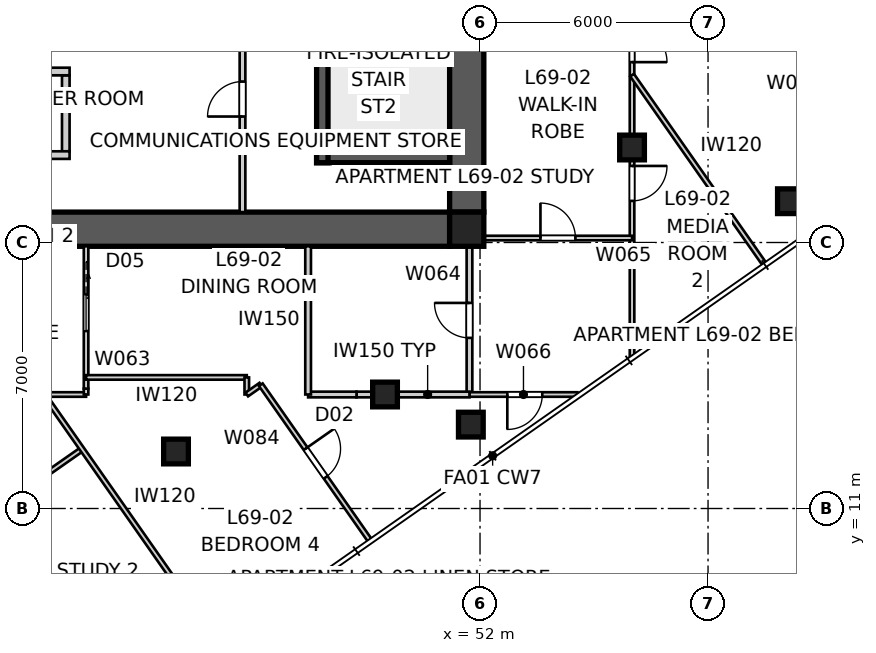
"""IFC4 building model, lengths in metres.
Left out: names, types, materials, properties, quantities, classifications, styles, units other than length and angle.
Written with IfcOpenShell. Run it as: python <this file> out.ifc"""

import sys

from ifc_helpers import new_model, si_unit, direction, frame, frame_2d, origin, origin_2d, place, context, subcontext, project, spatial, polyline, rectangle, outline, extrude, element, fill, save


model = new_model("IFC4")
c1 = context("Model", 3, precision=1e-05, world=origin(), true_north=direction((0.0, 1.0)))
c2 = subcontext(c1, "Body", "Model", "MODEL_VIEW")
j1 = project(units=[si_unit("LENGTHUNIT", "METRE"), si_unit("PLANEANGLEUNIT", "RADIAN")], contexts=[c1])
p1 = place(None, origin())
s1 = spatial("IfcSite", under=j1, at=p1, CompositionType="ELEMENT")
p2 = place(p1, origin())
s2 = spatial("IfcBuilding", under=s1, at=p2, CompositionType="ELEMENT")
p3 = place(p2, frame((0.0, 0.0, 250.6)))
s3 = spatial("IfcBuildingStorey", under=s2, at=p3, CompositionType="ELEMENT", Elevation=250.6)
p4 = place(p3, frame((51.2, 18.35, 0.0), z_axis=(0.0, 0.0, 1.0), x_axis=(-1.0, 0.0, 0.0)))
e1 = element("IfcWall", 1, at=p4, inside=s3, PredefinedType="SHEAR", context=c2, shape_type="SweptSolid", body=[
    extrude(outline(polyline([(0.0, -0.45), (22.4, -0.45), (22.4, -0.025), (22.85, -0.025), (22.85, 0.025), (22.4, 0.025), (22.4, 0.45), (0.0, 0.45), (0.0, 0.025), (-0.45, 0.025), (-0.45, -0.025), (0.0, -0.025), (0.0, -0.45)])), origin(), (0.0, 0.0, 1.0), 3.4),
])
p5 = place(p3, frame((51.65, 18.8, 0.0), z_axis=(0.0, 0.0, 1.0), x_axis=(0.0, 1.0, 0.0)))
e2 = element("IfcWall", 2, at=p5, inside=s3, PredefinedType="SHEAR", context=c2, shape_type="SweptSolid", body=[
    extrude(outline(polyline([(0.0, -0.45), (22.4, -0.45), (22.4, -0.025), (22.85, -0.025), (22.85, 0.025), (22.4, 0.025), (22.4, 0.45), (0.0, 0.45), (0.0, 0.025), (-0.45, 0.025), (-0.45, -0.025), (0.0, -0.025), (0.0, -0.45)])), origin(), (0.0, 0.0, 1.0), 3.4),
])
p6 = place(p5, frame((11.14, 0.0, 0.0)))
e3 = element("IfcOpeningElement", 3, at=p6, cuts=e2, PredefinedType="OPENING", context=c2, shape_type="SweptSolid", body=[
    extrude(rectangle(XDim=1.02, YDim=2.4, at=frame_2d((0.51, 1.2))), frame((0.0, 0.46, 0.0), z_axis=(0.0, -1.0, 0.0), x_axis=(1.0, 0.0, 0.0)), (0.0, 0.0, 1.0), 0.92),
])
p7 = place(p3, frame((47.85, 27.8, 0.0), z_axis=(0.0, 0.0, 1.0), x_axis=(0.0, -1.0, 0.0)))
e4 = element("IfcWall", 4, at=p7, inside=s3, PredefinedType="SHEAR", context=c2, shape_type="SweptSolid", body=[
    extrude(rectangle(XDim=7.7, YDim=0.3, at=frame_2d((3.85, 0.0))), origin(), (0.0, 0.0, 1.0), 3.4),
])
p8 = place(p3, frame((51.2, 20.25, 0.0), z_axis=(0.0, 0.0, 1.0), x_axis=(-1.0, 0.0, 0.0)))
e5 = element("IfcWall", 5, at=p8, inside=s3, PredefinedType="SHEAR", context=c2, shape_type="SweptSolid", body=[
    extrude(rectangle(XDim=3.5, YDim=0.3, at=frame_2d((1.75, 0.0))), origin(), (0.0, 0.0, 1.0), 3.4),
])
p9 = place(p3, frame((41.1, 22.4, 0.0), z_axis=(0.0, 0.0, 1.0), x_axis=(0.0, -1.0, 0.0)))
e6 = element("IfcWall", 6, at=p9, inside=s3, PredefinedType="SOLIDWALL", context=c2, shape_type="SweptSolid", body=[
    extrude(rectangle(XDim=2.0, YDim=0.2, at=frame_2d((1.0, 0.0))), origin(), (0.0, 0.0, 1.0), 3.4),
])
for number, where, z_axis, x_axis in (
    (7, (38.8, 22.5, 0.0), (0.0, 0.0, 1.0), (1.0, 0.0, 0.0)),
    (8, (38.8, 20.3, 0.0), (0.0, 0.0, 1.0), (1.0, 0.0, 0.0)),
):
    element("IfcWall", number, at=place(p3, frame(where, z_axis=z_axis, x_axis=x_axis)), inside=s3, PredefinedType="SOLIDWALL", context=c2, shape_type="SweptSolid", body=[
        extrude(rectangle(XDim=2.4, YDim=0.2, at=frame_2d((1.2, 0.0))), origin(), (0.0, 0.0, 1.0), 3.4),
    ])
p10 = place(p3, frame((51.65, 18.35, 0.0), z_axis=(0.0, 0.0, 1.0), x_axis=(1.0, 0.0, 0.0)))
e9 = element("IfcColumn", 9, at=p10, inside=s3, PredefinedType="COLUMN", context=c2, shape_type="SweptSolid", body=[
    extrude(rectangle(XDim=0.9, YDim=0.9, at=origin_2d()), origin(), (0.0, 0.0, 1.0), 3.4),
])
for number, where, z_axis, x_axis in (
    (10, (51.758, 13.207, 0.0), (0.0, 0.0, 1.0), (1.0, 0.0, 0.0)),
    (11, (60.155, 19.086, 0.0), (0.0, 0.0, 1.0), (1.0, 0.0, 0.0)),
    (12, (44.0, 12.5, 0.0), (0.0, 0.0, 1.0), (1.0, 0.0, 0.0)),
    (13, (49.5, 14.0, 0.0), (0.0, 0.0, 1.0), (1.0, 0.0, 0.0)),
    (14, (56.0, 20.5, 0.0), (0.0, 0.0, 1.0), (1.0, 0.0, 0.0)),
):
    element("IfcColumn", number, at=place(p3, frame(where, z_axis=z_axis, x_axis=x_axis)), inside=s3, PredefinedType="COLUMN", context=c2, shape_type="SweptSolid", body=[
        extrude(rectangle(XDim=0.65, YDim=0.65, at=origin_2d()), origin(), (0.0, 0.0, 1.0), 3.4),
    ])
p11 = place(p3, frame((45.75, 18.8, 0.0), z_axis=(0.0, 0.0, 1.0), x_axis=(0.0, 1.0, 0.0)))
e15 = element("IfcWall", 15, at=p11, inside=s3, PredefinedType="SOLIDWALL", context=c2, shape_type="SweptSolid", body=[
    extrude(rectangle(XDim=5.95, YDim=0.15, at=frame_2d((2.975, 0.0))), origin(), (0.0, 0.0, 1.0), 3.25),
])
p12 = place(p11, frame((2.515, 0.0, 0.0)))
e16 = element("IfcOpeningElement", 16, at=p12, cuts=e15, PredefinedType="OPENING", context=c2, shape_type="SweptSolid", body=[
    extrude(rectangle(XDim=0.92, YDim=2.1, at=frame_2d((0.46, 1.05))), frame((0.0, 0.085, 0.0), z_axis=(0.0, -1.0, 0.0), x_axis=(1.0, 0.0, 0.0)), (0.0, 0.0, 1.0), 0.17),
])
p13 = place(p3, frame((56.0, 41.203, 0.0), z_axis=(0.0, 0.0, 1.0), x_axis=(0.0, -1.0, 0.0)))
e17 = element("IfcWall", 17, at=p13, inside=s3, PredefinedType="PARTITIONING", context=c2, shape_type="SweptSolid", body=[
    extrude(rectangle(XDim=26.198, YDim=0.12, at=frame_2d((13.099, 0.0))), origin(), (0.0, 0.0, 1.0), 2.55),
])
p14 = place(p13, frame((21.188, 0.0, 0.0)))
e18 = element("IfcOpeningElement", 18, at=p14, cuts=e17, PredefinedType="OPENING", context=c2, shape_type="SweptSolid", body=[
    extrude(rectangle(XDim=0.92, YDim=2.34, at=frame_2d((0.46, 1.17))), frame((0.0, 0.07, 0.0), z_axis=(0.0, -1.0, 0.0), x_axis=(1.0, 0.0, 0.0)), (0.0, 0.0, 1.0), 0.14),
])
p15 = place(p13, frame((17.537, 0.0, 0.0)))
e19 = element("IfcOpeningElement", 19, at=p15, cuts=e17, PredefinedType="OPENING", context=c2, shape_type="SweptSolid", body=[
    extrude(rectangle(XDim=0.92, YDim=2.34, at=frame_2d((0.46, 1.17))), frame((0.0, 0.07, 0.0), z_axis=(0.0, -1.0, 0.0), x_axis=(1.0, 0.0, 0.0)), (0.0, 0.0, 1.0), 0.14),
])
p16 = place(p13, frame((2.221, 0.0, 0.0)))
e20 = element("IfcOpeningElement", 20, at=p16, cuts=e17, PredefinedType="OPENING", context=c2, shape_type="SweptSolid", body=[
    extrude(rectangle(XDim=0.96, YDim=2.1, at=frame_2d((0.48, 1.05))), frame((0.0, 0.07, 0.0), z_axis=(0.0, -1.0, 0.0), x_axis=(1.0, 0.0, 0.0)), (0.0, 0.0, 1.0), 0.14),
])
p17 = place(p3, frame((41.634, 14.0, 0.0), z_axis=(0.0, 0.0, 1.0), x_axis=(-1.0, 0.0, 0.0)))
e21 = element("IfcWall", 21, at=p17, inside=s3, PredefinedType="PARTITIONING", context=c2, shape_type="SweptSolid", body=[
    extrude(rectangle(XDim=16.628, YDim=0.12, at=frame_2d((8.314, 0.0))), origin(), (0.0, 0.0, 1.0), 2.55),
])
p18 = place(p17, frame((1.821, 0.0, 0.0)))
e22 = element("IfcOpeningElement", 22, at=p18, cuts=e21, PredefinedType="OPENING", context=c2, shape_type="SweptSolid", body=[
    extrude(rectangle(XDim=0.96, YDim=2.1, at=frame_2d((0.48, 1.05))), frame((0.0, 0.07, 0.0), z_axis=(0.0, -1.0, 0.0), x_axis=(1.0, 0.0, 0.0)), (0.0, 0.0, 1.0), 0.14),
])
p19 = place(p3, frame((41.634, 17.9, 0.0), z_axis=(0.0, 0.0, 1.0), x_axis=(0.0, -1.0, 0.0)))
e23 = element("IfcWall", 23, at=p19, inside=s3, PredefinedType="PARTITIONING", context=c2, shape_type="SweptSolid", body=[
    extrude(rectangle(XDim=3.746, YDim=0.12, at=frame_2d((1.873, 0.0))), origin(), (0.0, 0.0, 1.0), 3.25),
])
p20 = place(p19, frame((1.27, 0.0, 0.0)))
e24 = element("IfcOpeningElement", 24, at=p20, cuts=e23, PredefinedType="OPENING", context=c2, shape_type="SweptSolid", body=[
    extrude(rectangle(XDim=0.96, YDim=2.1, at=frame_2d((0.48, 1.05))), frame((0.0, 0.07, 0.0), z_axis=(0.0, -1.0, 0.0), x_axis=(1.0, 0.0, 0.0)), (0.0, 0.0, 1.0), 0.14),
])
p21 = place(p3, frame((51.722, 14.0, 0.0), z_axis=(0.0, 0.0, 1.0), x_axis=(0.0, 1.0, 0.0)))
e25 = element("IfcWall", 25, at=p21, inside=s3, PredefinedType="SOLIDWALL", context=c2, shape_type="SweptSolid", body=[
    extrude(rectangle(XDim=4.82, YDim=0.15, at=frame_2d((2.41, 0.0))), origin(), (0.0, 0.0, 1.0), 3.25),
])
p22 = place(p21, frame((1.49, 0.0, 0.0)))
e26 = element("IfcOpeningElement", 26, at=p22, cuts=e25, PredefinedType="OPENING", context=c2, shape_type="SweptSolid", body=[
    extrude(rectangle(XDim=0.92, YDim=2.1, at=frame_2d((0.46, 1.05))), frame((0.0, 0.085, 0.0), z_axis=(0.0, -1.0, 0.0), x_axis=(1.0, 0.0, 0.0)), (0.0, 0.0, 1.0), 0.17),
])
p23 = place(p3, frame((51.777, 18.118, 0.0), z_axis=(0.0, 0.0, 1.0), x_axis=(1.0, 0.0, 0.0)))
e27 = element("IfcWall", 27, at=p23, inside=s3, PredefinedType="PARTITIONING", context=c2, shape_type="SweptSolid", body=[
    extrude(rectangle(XDim=4.223, YDim=0.12, at=frame_2d((2.111, 0.0))), origin(), (0.0, 0.0, 1.0), 3.25),
])
p24 = place(p23, frame((1.812, 0.0, 0.0)))
e28 = element("IfcOpeningElement", 28, at=p24, cuts=e27, PredefinedType="OPENING", context=c2, shape_type="SweptSolid", body=[
    extrude(rectangle(XDim=0.92, YDim=2.1, at=frame_2d((0.46, 1.05))), frame((0.0, 0.07, 0.0), z_axis=(0.0, -1.0, 0.0), x_axis=(1.0, 0.0, 0.0)), (0.0, 0.0, 1.0), 0.14),
])
p25 = place(p3, frame((54.564, 14.0, 0.0), z_axis=(0.0, 0.0, 1.0), x_axis=(-1.0, 0.0, 0.0)))
e29 = element("IfcWall", 29, at=p25, inside=s3, PredefinedType="PARTITIONING", context=c2, shape_type="SweptSolid", body=[
    extrude(rectangle(XDim=2.842, YDim=0.12, at=frame_2d((1.421, 0.0))), origin(), (0.0, 0.0, 1.0), 3.25),
])
p26 = place(p25, frame((0.926, 0.0, 0.0)))
e30 = element("IfcOpeningElement", 30, at=p26, cuts=e29, PredefinedType="OPENING", context=c2, shape_type="SweptSolid", body=[
    extrude(rectangle(XDim=0.92, YDim=2.34, at=frame_2d((0.46, 1.17))), frame((0.0, 0.07, 0.0), z_axis=(0.0, -1.0, 0.0), x_axis=(1.0, 0.0, 0.0)), (0.0, 0.0, 1.0), 0.14),
])
p27 = place(p3, frame((51.722, 14.0, 0.0), z_axis=(0.0, 0.0, 1.0), x_axis=(-1.0, 0.0, 0.0)))
e31 = element("IfcWall", 31, at=p27, inside=s3, PredefinedType="SOLIDWALL", context=c2, shape_type="SweptSolid", body=[
    extrude(rectangle(XDim=2.202, YDim=0.15, at=frame_2d((1.101, 0.0))), origin(), (0.0, 0.0, 1.0), 3.25),
])
p28 = place(p3, frame((49.521, 14.0, 0.0), z_axis=(0.0, 0.0, 1.0), x_axis=(-1.0, 0.0, 0.0)))
e32 = element("IfcWall", 32, at=p28, inside=s3, PredefinedType="SOLIDWALL", context=c2, shape_type="SweptSolid", body=[
    extrude(rectangle(XDim=0.771, YDim=0.15, at=frame_2d((0.385, 0.0))), origin(), (0.0, 0.0, 1.0), 2.55),
])
p29 = place(p3, frame((48.75, 14.0, 0.0), z_axis=(0.0, 0.0, 1.0), x_axis=(-1.0, 0.0, 0.0)))
e33 = element("IfcWall", 33, at=p29, inside=s3, PredefinedType="SOLIDWALL", context=c2, shape_type="SweptSolid", body=[
    extrude(rectangle(XDim=1.274, YDim=0.15, at=frame_2d((0.637, 0.0))), origin(), (0.0, 0.0, 1.0), 3.25),
])
p30 = place(p3, frame((47.476, 14.0, 0.0), z_axis=(0.0, 0.0, 1.0), x_axis=(0.0, 1.0, 0.0)))
e34 = element("IfcWall", 34, at=p30, inside=s3, PredefinedType="SOLIDWALL", context=c2, shape_type="SweptSolid", body=[
    extrude(rectangle(XDim=3.9, YDim=0.15, at=frame_2d((1.95, 0.0))), origin(), (0.0, 0.0, 1.0), 3.25),
])
p31 = place(p3, frame((41.528, 12.562, 0.0), z_axis=(0.0, 0.0, 1.0), x_axis=(-0.819155207289, -0.573571919092, 0.0)))
e35 = element("IfcWall", 35, at=p31, inside=s3, PredefinedType="PARTITIONING", context=c2, shape_type="SweptSolid", body=[
    extrude(rectangle(XDim=12.71, YDim=0.12, at=frame_2d((6.355, 0.0))), origin(), (0.0, 0.0, 1.0), 3.25),
])
p32 = place(p31, frame((8.077, 0.0, 0.0)))
e36 = element("IfcOpeningElement", 36, at=p32, cuts=e35, PredefinedType="OPENING", context=c2, shape_type="SweptSolid", body=[
    extrude(rectangle(XDim=0.92, YDim=2.34, at=frame_2d((0.46, 1.17))), frame((0.0, 0.07, 0.0), z_axis=(0.0, -1.0, 0.0), x_axis=(1.0, 0.0, 0.0)), (0.0, 0.0, 1.0), 0.14),
])
p33 = place(p31, frame((1.752, 0.0, 0.0)))
e37 = element("IfcOpeningElement", 37, at=p33, cuts=e35, PredefinedType="OPENING", context=c2, shape_type="SweptSolid", body=[
    extrude(rectangle(XDim=0.92, YDim=2.34, at=frame_2d((0.46, 1.17))), frame((0.0, 0.07, 0.0), z_axis=(0.0, -1.0, 0.0), x_axis=(1.0, 0.0, 0.0)), (0.0, 0.0, 1.0), 0.14),
])
p34 = place(p3, frame((40.521, 14.0, 0.0), z_axis=(0.0, 0.0, 1.0), x_axis=(0.573574225095, -0.819153592623, 0.0)))
e38 = element("IfcWall", 38, at=p34, inside=s3, PredefinedType="PARTITIONING", context=c2, shape_type="SweptSolid", body=[
    extrude(rectangle(XDim=8.054, YDim=0.12, at=frame_2d((4.027, 0.0))), origin(), (0.0, 0.0, 1.0), 3.25),
])
p35 = place(p3, frame((37.944, 10.053, 0.0), z_axis=(0.0, 0.0, 1.0), x_axis=(0.573587188897, -0.81914451517, 0.0)))
e39 = element("IfcWall", 39, at=p35, inside=s3, PredefinedType="PARTITIONING", context=c2, shape_type="SweptSolid", body=[
    extrude(rectangle(XDim=6.3, YDim=0.12, at=frame_2d((3.15, 0.0))), origin(), (0.0, 0.0, 1.0), 3.25),
])
p36 = place(p3, frame((63.06, 19.949, 0.0), z_axis=(0.0, 0.0, 1.0), x_axis=(-0.573576357466, 0.819152099525, 0.0)))
e40 = element("IfcWall", 40, at=p36, inside=s3, PredefinedType="PARTITIONING", context=c2, shape_type="SweptSolid", body=[
    extrude(rectangle(XDim=8.335, YDim=0.12, at=frame_2d((4.167, 0.0))), origin(), (0.0, 0.0, 1.0), 3.25),
])
p37 = place(p36, frame((5.688, 0.0, 0.0)))
e41 = element("IfcOpeningElement", 41, at=p37, cuts=e40, PredefinedType="OPENING", context=c2, shape_type="SweptSolid", body=[
    extrude(rectangle(XDim=0.92, YDim=2.34, at=frame_2d((0.46, 1.17))), frame((0.0, 0.07, 0.0), z_axis=(0.0, -1.0, 0.0), x_axis=(1.0, 0.0, 0.0)), (0.0, 0.0, 1.0), 0.14),
])
p38 = place(p36, frame((1.525, 0.0, 0.0)))
e42 = element("IfcOpeningElement", 42, at=p38, cuts=e40, PredefinedType="OPENING", context=c2, shape_type="SweptSolid", body=[
    extrude(rectangle(XDim=0.92, YDim=2.34, at=frame_2d((0.46, 1.17))), frame((0.0, 0.07, 0.0), z_axis=(0.0, -1.0, 0.0), x_axis=(1.0, 0.0, 0.0)), (0.0, 0.0, 1.0), 0.14),
])
p39 = place(p3, frame((59.477, 17.44, 0.0), z_axis=(0.0, 0.0, 1.0), x_axis=(-0.573573173989, 0.81915432861, 0.0)))
e43 = element("IfcWall", 43, at=p39, inside=s3, PredefinedType="PARTITIONING", context=c2, shape_type="SweptSolid", body=[
    extrude(rectangle(XDim=6.061, YDim=0.12, at=frame_2d((3.031, 0.0))), origin(), (0.0, 0.0, 1.0), 3.25),
])
p40 = place(p3, frame((41.634, 14.45, 0.0), z_axis=(0.0, 0.0, 1.0), x_axis=(1.0, 0.0, 0.0)))
e44 = element("IfcWall", 44, at=p40, inside=s3, PredefinedType="PARTITIONING", context=c2, shape_type="SweptSolid", body=[
    extrude(rectangle(XDim=4.229, YDim=0.12, at=frame_2d((2.114, 0.0))), origin(), (0.0, 0.0, 1.0), 3.25),
])
for number, where, z_axis, x_axis in (
    (45, (45.862, 14.45, 0.0), (0.0, 0.0, 1.0), (0.0, -1.0, 0.0)),
    (46, (45.862, 14.0, 0.0), (0.0, 0.0, 1.0), (0.819, 0.573, 0.0)),
):
    element("IfcWall", number, at=place(p3, frame(where, z_axis=z_axis, x_axis=x_axis)), inside=s3, PredefinedType="PARTITIONING", context=c2, shape_type="SweptSolid", body=[
        extrude(rectangle(XDim=0.45, YDim=0.12, at=frame_2d((0.225, 0.0))), origin(), (0.0, 0.0, 1.0), 3.25),
    ])
p41 = place(p3, frame((46.231, 14.258, 0.0), z_axis=(0.0, 0.0, 1.0), x_axis=(0.57358708951, -0.819144584763, 0.0)))
e47 = element("IfcWall", 47, at=p41, inside=s3, PredefinedType="PARTITIONING", context=c2, shape_type="SweptSolid", body=[
    extrude(rectangle(XDim=4.991, YDim=0.12, at=frame_2d((2.496, 0.0))), origin(), (0.0, 0.0, 1.0), 3.25),
])
p42 = place(p41, frame((2.055, 0.0, 0.0)))
e48 = element("IfcOpeningElement", 48, at=p42, cuts=e47, PredefinedType="OPENING", context=c2, shape_type="SweptSolid", body=[
    extrude(rectangle(XDim=0.92, YDim=2.34, at=frame_2d((0.46, 1.17))), frame((0.0, 0.07, 0.0), z_axis=(0.0, -1.0, 0.0), x_axis=(1.0, 0.0, 0.0)), (0.0, 0.0, 1.0), 0.14),
])
p43 = place(p3, frame((41.634, 14.0, 0.0), z_axis=(0.0, 0.0, 1.0), x_axis=(0.0, 1.0, 0.0)))
e49 = element("IfcWall", 49, at=p43, inside=s3, PredefinedType="PARTITIONING", context=c2, shape_type="SweptSolid", body=[
    extrude(rectangle(XDim=0.154, YDim=0.12, at=frame_2d((0.077, 0.0))), origin(), (0.0, 0.0, 1.0), 3.25),
])
p44 = place(p12, origin())
e50 = element("IfcDoor", 50, at=p44, inside=s3, OperationType="SINGLE_SWING_LEFT", PredefinedType="DOOR", context=c2, shape_type="SweptSolid", body=[
    extrude(rectangle(XDim=0.92, YDim=2.1, at=frame_2d((0.46, 1.05))), frame((0.0, 0.025, 0.0), z_axis=(0.0, -1.0, 0.0), x_axis=(1.0, 0.0, 0.0)), (0.0, 0.0, 1.0), 0.05),
])
fill(e16, e50)
p45 = place(p14, origin())
e51 = element("IfcDoor", 51, at=p45, inside=s3, OperationType="SINGLE_SWING_LEFT", PredefinedType="DOOR", context=c2, shape_type="SweptSolid", body=[
    extrude(rectangle(XDim=0.92, YDim=2.34, at=frame_2d((0.46, 1.17))), frame((0.0, 0.025, 0.0), z_axis=(0.0, -1.0, 0.0), x_axis=(1.0, 0.0, 0.0)), (0.0, 0.0, 1.0), 0.05),
])
fill(e18, e51)
p46 = place(p24, origin())
e52 = element("IfcDoor", 52, at=p46, inside=s3, OperationType="SINGLE_SWING_LEFT", PredefinedType="DOOR", context=c2, shape_type="SweptSolid", body=[
    extrude(rectangle(XDim=0.92, YDim=2.1, at=frame_2d((0.46, 1.05))), frame((0.0, 0.025, 0.0), z_axis=(0.0, -1.0, 0.0), x_axis=(1.0, 0.0, 0.0)), (0.0, 0.0, 1.0), 0.05),
])
fill(e28, e52)
p47 = place(p15, origin())
e53 = element("IfcDoor", 53, at=p47, inside=s3, OperationType="SINGLE_SWING_RIGHT", PredefinedType="DOOR", context=c2, shape_type="SweptSolid", body=[
    extrude(rectangle(XDim=0.92, YDim=2.34, at=frame_2d((0.46, 1.17))), frame((0.0, 0.025, 0.0), z_axis=(0.0, -1.0, 0.0), x_axis=(1.0, 0.0, 0.0)), (0.0, 0.0, 1.0), 0.05),
])
fill(e19, e53)
p48 = place(p22, origin())
e54 = element("IfcDoor", 54, at=p48, inside=s3, OperationType="SINGLE_SWING_RIGHT", PredefinedType="DOOR", context=c2, shape_type="SweptSolid", body=[
    extrude(rectangle(XDim=0.92, YDim=2.1, at=frame_2d((0.46, 1.05))), frame((0.0, 0.025, 0.0), z_axis=(0.0, -1.0, 0.0), x_axis=(1.0, 0.0, 0.0)), (0.0, 0.0, 1.0), 0.05),
])
fill(e26, e54)
p49 = place(p26, origin())
e55 = element("IfcDoor", 55, at=p49, inside=s3, OperationType="SINGLE_SWING_RIGHT", PredefinedType="DOOR", context=c2, shape_type="SweptSolid", body=[
    extrude(rectangle(XDim=0.92, YDim=2.34, at=frame_2d((0.46, 1.17))), frame((0.0, 0.025, 0.0), z_axis=(0.0, -1.0, 0.0), x_axis=(1.0, 0.0, 0.0)), (0.0, 0.0, 1.0), 0.05),
])
fill(e30, e55)
p50 = place(p42, origin())
e56 = element("IfcDoor", 56, at=p50, inside=s3, OperationType="SINGLE_SWING_LEFT", PredefinedType="DOOR", context=c2, shape_type="SweptSolid", body=[
    extrude(rectangle(XDim=0.92, YDim=2.34, at=frame_2d((0.46, 1.17))), frame((0.0, 0.025, 0.0), z_axis=(0.0, -1.0, 0.0), x_axis=(1.0, 0.0, 0.0)), (0.0, 0.0, 1.0), 0.05),
])
fill(e48, e56)
p51 = place(p20, origin())
e57 = element("IfcDoor", 57, at=p51, inside=s3, OperationType="SLIDING_TO_LEFT", PredefinedType="DOOR", context=c2, shape_type="SweptSolid", body=[
    extrude(rectangle(XDim=0.96, YDim=2.1, at=frame_2d((0.48, 1.05))), frame((0.0, 0.025, 0.0), z_axis=(0.0, -1.0, 0.0), x_axis=(1.0, 0.0, 0.0)), (0.0, 0.0, 1.0), 0.05),
])
fill(e24, e57)
save(model, sys.argv[1])
